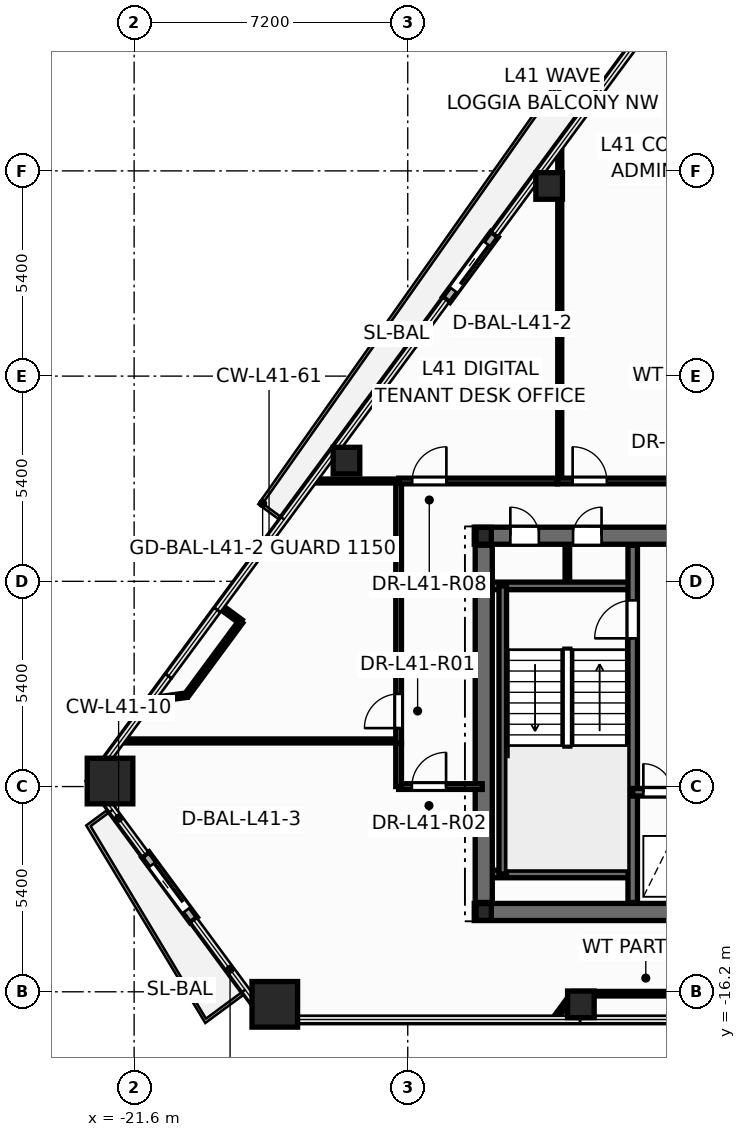
"""IFC4 building model, lengths in metres.
Left out: names, types, materials, properties, quantities, classifications, styles, units other than length and angle.
Written with IfcOpenShell. Run it as: python <this file> out.ifc"""

import sys

from ifc_helpers import new_model, si_unit, direction, frame, frame_2d, origin, origin_2d, place, context, subcontext, project, spatial, rectangle, hollow_rectangle, hollow_circle, i_section, extrude, element, fill, save


model = new_model("IFC4")
c1 = context("Model", 3, precision=1e-05, world=origin(), true_north=direction((0.0, 1.0)))
c2 = subcontext(c1, "Body", "Model", "MODEL_VIEW")
j1 = project(units=[si_unit("LENGTHUNIT", "METRE"), si_unit("PLANEANGLEUNIT", "RADIAN")], contexts=[c1])
p1 = place(None, origin())
s1 = spatial("IfcSite", under=j1, at=p1, CompositionType="ELEMENT")
p2 = place(p1, origin())
s2 = spatial("IfcBuilding", under=s1, at=p2, CompositionType="ELEMENT")
p3 = place(p2, frame((0.0, 0.0, 158.1)))
s3 = spatial("IfcBuildingStorey", under=s2, at=p3, CompositionType="ELEMENT", Elevation=158.1)
for number, where, z_axis, x_axis in (
    (1, (-22.234, -10.655, 0.0), (0.0, 0.0, 1.0), (1.0, 0.0, 0.0)),
    (2, (-17.898, -16.53, 0.0), (0.0, 0.0, 1.0), (1.0, 0.0, 0.0)),
):
    element("IfcColumn", number, at=place(p3, frame(where, z_axis=z_axis, x_axis=x_axis)), inside=s3, PredefinedType="COLUMN", context=c2, shape_type="SweptSolid", body=[
        extrude(hollow_rectangle(XDim=1.2, YDim=1.2, WallThickness=0.055, at=origin_2d()), origin(), (0.0, 0.0, 1.0), 3.6),
    ])
for number, where, z_axis, x_axis in (
    (3, (-9.844, -16.53, 0.0), (0.0, 0.0, 1.0), (1.0, 0.0, 0.0)),
    (4, (-10.679, 5.003, 0.0), (0.0, 0.0, 1.0), (1.0, 0.0, 0.0)),
    (5, (-16.012, -2.223, 0.0), (0.0, 0.0, 1.0), (1.0, 0.0, 0.0)),
):
    element("IfcColumn", number, at=place(p3, frame(where, z_axis=z_axis, x_axis=x_axis)), inside=s3, PredefinedType="COLUMN", context=c2, shape_type="SweptSolid", body=[
        extrude(hollow_circle(Radius=0.35, WallThickness=0.03, at=origin_2d()), origin(), (0.0, 0.0, 1.0), 3.6),
    ])
for number, where, z_axis, x_axis in (
    (6, (-12.4, -14.1, 0.0), (0.0, 0.0, 1.0), (1.0, 0.0, 0.0)),
    (7, (-12.4, -4.2, 0.0), (0.0, 0.0, 1.0), (1.0, 0.0, 0.0)),
):
    element("IfcColumn", number, at=place(p3, frame(where, z_axis=z_axis, x_axis=x_axis)), inside=s3, PredefinedType="COLUMN", context=c2, shape_type="SweptSolid", body=[
        extrude(i_section(OverallWidth=0.4, OverallDepth=0.44, WebThickness=0.028, FlangeThickness=0.04, at=origin_2d()), origin(), (0.0, 0.0, 1.0), 3.6),
    ])
p4 = place(p3, frame((-12.115, 3.731, -0.015), z_axis=(0.0, 0.0, 1.0), x_axis=(-0.593794270714, -0.804616905158, 0.0)))
e8 = element("IfcWall", 8, at=p4, inside=s3, PredefinedType="STANDARD", context=c2, shape_type="SweptSolid", body=[
    extrude(rectangle(XDim=2.14, YDim=0.24, at=frame_2d((1.07, 0.0))), origin(), (0.0, 0.0, 1.0), 2.807),
])
p5 = place(p4, frame((0.32, 0.0, 0.015)))
e9 = element("IfcOpeningElement", 9, at=p5, cuts=e8, PredefinedType="OPENING", context=c2, shape_type="SweptSolid", body=[
    extrude(rectangle(XDim=1.506, YDim=2.204, at=frame_2d((0.75, 1.102))), frame((0.0, 0.13, 0.0), z_axis=(0.0, -1.0, 0.0), x_axis=(1.0, 0.0, 0.0)), (0.0, 0.0, 1.0), 0.26),
])
p6 = place(p3, frame((-21.303, -12.589, -0.015), z_axis=(0.0, 0.0, 1.0), x_axis=(0.593794270714, -0.804616905158, 0.0)))
e10 = element("IfcWall", 10, at=p6, inside=s3, PredefinedType="STANDARD", context=c2, shape_type="SweptSolid", body=[
    extrude(rectangle(XDim=2.14, YDim=0.24, at=frame_2d((1.07, 0.0))), origin(), (0.0, 0.0, 1.0), 2.807),
])
p7 = place(p6, frame((0.32, 0.0, 0.015)))
e11 = element("IfcOpeningElement", 11, at=p7, cuts=e10, PredefinedType="OPENING", context=c2, shape_type="SweptSolid", body=[
    extrude(rectangle(XDim=1.506, YDim=2.204, at=frame_2d((0.75, 1.102))), frame((0.0, 0.13, 0.0), z_axis=(0.0, -1.0, 0.0), x_axis=(1.0, 0.0, 0.0)), (0.0, 0.0, 1.0), 0.26),
])
p8 = place(p3, frame((-10.2, -5.52, 0.0), z_axis=(0.0, 0.0, 1.0), x_axis=(0.0, 1.0, 0.0)))
e12 = element("IfcWall", 12, at=p8, inside=s3, PredefinedType="PARTITIONING", context=c2, shape_type="SweptSolid", body=[
    extrude(rectangle(XDim=1.12, YDim=0.12, at=frame_2d((0.56, 0.0))), origin(), (0.0, 0.0, 1.0), 3.35),
])
p9 = place(p3, frame((-12.65, -14.1, 0.0), z_axis=(0.0, 0.0, 1.0), x_axis=(1.0, 0.0, 0.0)))
e13 = element("IfcWall", 13, at=p9, inside=s3, PredefinedType="SHEAR", context=c2, shape_type="SweptSolid", body=[
    extrude(rectangle(XDim=25.3, YDim=0.45, at=frame_2d((12.65, 0.0))), origin(), (0.0, 0.0, 1.0), 3.6),
])
p10 = place(p3, frame((-12.65, -4.2, 0.0), z_axis=(0.0, 0.0, 1.0), x_axis=(1.0, 0.0, 0.0)))
e14 = element("IfcWall", 14, at=p10, inside=s3, PredefinedType="SHEAR", context=c2, shape_type="SweptSolid", body=[
    extrude(rectangle(XDim=25.3, YDim=0.45, at=frame_2d((12.65, 0.0))), origin(), (0.0, 0.0, 1.0), 3.6),
])
p11 = place(p10, frame((0.95, 0.0, 0.0)))
e15 = element("IfcOpeningElement", 15, at=p11, cuts=e14, PredefinedType="OPENING", context=c2, shape_type="SweptSolid", body=[
    extrude(rectangle(XDim=0.756, YDim=2.054, at=frame_2d((0.375, 1.027))), frame((0.0, 0.235, 0.0), z_axis=(0.0, -1.0, 0.0), x_axis=(1.0, 0.0, 0.0)), (0.0, 0.0, 1.0), 0.47),
])
p12 = place(p10, frame((2.6, 0.0, 0.0)))
e16 = element("IfcOpeningElement", 16, at=p12, cuts=e14, PredefinedType="OPENING", context=c2, shape_type="SweptSolid", body=[
    extrude(rectangle(XDim=0.756, YDim=2.054, at=frame_2d((0.375, 1.027))), frame((0.0, 0.235, 0.0), z_axis=(0.0, -1.0, 0.0), x_axis=(1.0, 0.0, 0.0)), (0.0, 0.0, 1.0), 0.47),
])
p13 = place(p10, frame((21.85, 0.0, 0.0)))
e17 = element("IfcOpeningElement", 17, at=p13, cuts=e14, PredefinedType="OPENING", context=c2, shape_type="SweptSolid", body=[
    extrude(rectangle(XDim=0.756, YDim=2.054, at=frame_2d((0.375, 1.027))), frame((0.0, 0.235, 0.0), z_axis=(0.0, -1.0, 0.0), x_axis=(1.0, 0.0, 0.0)), (0.0, 0.0, 1.0), 0.47),
])
p14 = place(p10, frame((23.5, 0.0, 0.0)))
e18 = element("IfcOpeningElement", 18, at=p14, cuts=e14, PredefinedType="OPENING", context=c2, shape_type="SweptSolid", body=[
    extrude(rectangle(XDim=0.756, YDim=2.054, at=frame_2d((0.375, 1.027))), frame((0.0, 0.235, 0.0), z_axis=(0.0, -1.0, 0.0), x_axis=(1.0, 0.0, 0.0)), (0.0, 0.0, 1.0), 0.47),
])
p15 = place(p10, frame((5.85, 0.0, 0.0)))
e19 = element("IfcOpeningElement", 19, at=p15, cuts=e14, PredefinedType="OPENING", context=c2, shape_type="SweptSolid", body=[
    extrude(rectangle(XDim=1.006, YDim=2.104, at=frame_2d((0.5, 1.052))), frame((0.0, 0.235, 0.0), z_axis=(0.0, -1.0, 0.0), x_axis=(1.0, 0.0, 0.0)), (0.0, 0.0, 1.0), 0.47),
])
p16 = place(p10, frame((10.35, 0.0, 0.0)))
e20 = element("IfcOpeningElement", 20, at=p16, cuts=e14, PredefinedType="OPENING", context=c2, shape_type="SweptSolid", body=[
    extrude(rectangle(XDim=1.406, YDim=2.154, at=frame_2d((0.7, 1.077))), frame((0.0, 0.235, 0.0), z_axis=(0.0, -1.0, 0.0), x_axis=(1.0, 0.0, 0.0)), (0.0, 0.0, 1.0), 0.47),
])
p17 = place(p10, frame((18.45, 0.0, 0.0)))
e21 = element("IfcOpeningElement", 21, at=p17, cuts=e14, PredefinedType="OPENING", context=c2, shape_type="SweptSolid", body=[
    extrude(rectangle(XDim=1.006, YDim=2.104, at=frame_2d((0.5, 1.052))), frame((0.0, 0.235, 0.0), z_axis=(0.0, -1.0, 0.0), x_axis=(1.0, 0.0, 0.0)), (0.0, 0.0, 1.0), 0.47),
])
for number, where, z_axis, x_axis in (
    (22, (-12.35, -5.52, 0.0), (0.0, 0.0, 1.0), (1.0, 0.0, 0.0)),
    (23, (-12.35, -13.1, 0.0), (0.0, 0.0, 1.0), (1.0, 0.0, 0.0)),
):
    element("IfcWall", number, at=place(p3, frame(where, z_axis=z_axis, x_axis=x_axis)), inside=s3, PredefinedType="SOLIDWALL", context=c2, shape_type="SweptSolid", body=[
        extrude(rectangle(XDim=3.87, YDim=0.2, at=frame_2d((1.935, 0.0))), origin(), (0.0, 0.0, 1.0), 3.6),
    ])
p18 = place(p3, frame((-11.9, -13.1, 0.0), z_axis=(0.0, 0.0, 1.0), x_axis=(0.0, 1.0, 0.0)))
e24 = element("IfcWall", 24, at=p18, inside=s3, PredefinedType="SOLIDWALL", context=c2, shape_type="SweptSolid", body=[
    extrude(rectangle(XDim=7.58, YDim=0.2, at=frame_2d((3.79, 0.0))), origin(), (0.0, 0.0, 1.0), 3.6),
])
p19 = place(p3, frame((-8.48, -13.85, 0.0), z_axis=(0.0, 0.0, 1.0), x_axis=(0.0, 1.0, 0.0)))
e25 = element("IfcWall", 25, at=p19, inside=s3, PredefinedType="SHEAR", context=c2, shape_type="SweptSolid", body=[
    extrude(rectangle(XDim=9.4, YDim=0.25, at=frame_2d((4.7, 0.0))), origin(), (0.0, 0.0, 1.0), 3.6),
])
p20 = place(p19, frame((6.95, 0.0, 0.0)))
e26 = element("IfcOpeningElement", 26, at=p20, cuts=e25, PredefinedType="OPENING", context=c2, shape_type="SweptSolid", body=[
    extrude(rectangle(XDim=1.006, YDim=2.104, at=frame_2d((0.5, 1.052))), frame((0.0, 0.135, 0.0), z_axis=(0.0, -1.0, 0.0), x_axis=(1.0, 0.0, 0.0)), (0.0, 0.0, 1.0), 0.27),
])
p21 = place(p3, frame((-8.48, -10.95, 0.0), z_axis=(0.0, 0.0, 1.0), x_axis=(1.0, 0.0, 0.0)))
e27 = element("IfcWall", 27, at=p21, inside=s3, PredefinedType="SOLIDWALL", context=c2, shape_type="SweptSolid", body=[
    extrude(rectangle(XDim=3.36, YDim=0.2, at=frame_2d((1.68, 0.0))), origin(), (0.0, 0.0, 1.0), 3.6),
])
p22 = place(p21, frame((0.28, 0.0, 0.0)))
e28 = element("IfcOpeningElement", 28, at=p22, cuts=e27, PredefinedType="OPENING", context=c2, shape_type="SweptSolid", body=[
    extrude(rectangle(XDim=0.756, YDim=2.054, at=frame_2d((0.375, 1.027))), frame((0.0, 0.11, 0.0), z_axis=(0.0, -1.0, 0.0), x_axis=(1.0, 0.0, 0.0)), (0.0, 0.0, 1.0), 0.22),
])
p23 = place(p21, frame((1.85, 0.0, 0.0)))
e29 = element("IfcOpeningElement", 29, at=p23, cuts=e27, PredefinedType="OPENING", context=c2, shape_type="SweptSolid", body=[
    extrude(rectangle(XDim=1.106, YDim=2.104, at=frame_2d((0.55, 1.052))), frame((0.0, 0.11, 0.0), z_axis=(0.0, -1.0, 0.0), x_axis=(1.0, 0.0, 0.0)), (0.0, 0.0, 1.0), 0.22),
])
p24 = place(p3, frame((-12.4, -13.85, 0.0), z_axis=(0.0, 0.0, 1.0), x_axis=(0.0, 1.0, 0.0)))
e30 = element("IfcWall", 30, at=p24, inside=s3, PredefinedType="SHEAR", context=c2, shape_type="SweptSolid", body=[
    extrude(rectangle(XDim=9.4, YDim=0.45, at=frame_2d((4.7, 0.0))), origin(), (0.0, 0.0, 1.0), 3.6),
])
p25 = place(p3, frame((-10.4, -2.76, 0.0), z_axis=(0.0, 0.0, 1.0), x_axis=(0.0, 1.0, 0.0)))
e31 = element("IfcWall", 31, at=p25, inside=s3, PredefinedType="PARTITIONING", context=c2, shape_type="SweptSolid", body=[
    extrude(rectangle(XDim=8.815, YDim=0.105, at=frame_2d((4.408, 0.0))), origin(), (0.0, 0.0, 1.0), 2.617),
])
p26 = place(p3, frame((-21.953, -9.6, 0.0), z_axis=(0.0, 0.0, 1.0), x_axis=(1.0, 0.0, 0.0)))
e32 = element("IfcWall", 32, at=p26, inside=s3, PredefinedType="PARTITIONING", context=c2, shape_type="SweptSolid", body=[
    extrude(rectangle(XDim=7.313, YDim=0.105, at=frame_2d((3.656, 0.0))), origin(), (0.0, 0.0, 1.0), 2.325),
])
p27 = place(p3, frame((-14.64, -9.66, 0.0), z_axis=(0.0, 0.0, 1.0), x_axis=(0.0, 1.0, 0.0)))
e33 = element("IfcWall", 33, at=p27, inside=s3, PredefinedType="PARTITIONING", context=c2, shape_type="SweptSolid", body=[
    extrude(rectangle(XDim=6.9, YDim=0.15, at=frame_2d((3.45, 0.0))), origin(), (0.0, 0.0, 1.0), 2.325),
])
p28 = place(p27, frame((0.398, 0.0, 0.0)))
e34 = element("IfcOpeningElement", 34, at=p28, cuts=e33, PredefinedType="OPENING", context=c2, shape_type="SweptSolid", body=[
    extrude(rectangle(XDim=0.906, YDim=2.104, at=frame_2d((0.45, 1.052))), frame((0.0, 0.085, 0.0), z_axis=(0.0, -1.0, 0.0), x_axis=(1.0, 0.0, 0.0)), (0.0, 0.0, 1.0), 0.17),
])
p29 = place(p3, frame((-10.46, -2.76, 0.0), z_axis=(0.0, 0.0, 1.0), x_axis=(1.0, 0.0, 0.0)))
e35 = element("IfcWall", 35, at=p29, inside=s3, PredefinedType="PARTITIONING", context=c2, shape_type="SweptSolid", body=[
    extrude(rectangle(XDim=6.12, YDim=0.15, at=frame_2d((3.06, 0.0))), origin(), (0.0, 0.0, 1.0), 2.325),
])
p30 = place(p29, frame((0.399, 0.0, 0.0)))
e36 = element("IfcOpeningElement", 36, at=p30, cuts=e35, PredefinedType="OPENING", context=c2, shape_type="SweptSolid", body=[
    extrude(rectangle(XDim=0.906, YDim=2.104, at=frame_2d((0.45, 1.052))), frame((0.0, 0.085, 0.0), z_axis=(0.0, -1.0, 0.0), x_axis=(1.0, 0.0, 0.0)), (0.0, 0.0, 1.0), 0.17),
])
p31 = place(p3, frame((-14.64, -2.76, 0.0), z_axis=(0.0, 0.0, 1.0), x_axis=(1.0, 0.0, 0.0)))
e37 = element("IfcWall", 37, at=p31, inside=s3, PredefinedType="PARTITIONING", context=c2, shape_type="SweptSolid", body=[
    extrude(rectangle(XDim=4.178, YDim=0.15, at=frame_2d((2.089, 0.0))), origin(), (0.0, 0.0, 1.0), 3.35),
])
p32 = place(p31, frame((0.357, 0.0, 0.0)))
e38 = element("IfcOpeningElement", 38, at=p32, cuts=e37, PredefinedType="OPENING", context=c2, shape_type="SweptSolid", body=[
    extrude(rectangle(XDim=0.906, YDim=2.104, at=frame_2d((0.45, 1.052))), frame((0.0, 0.085, 0.0), z_axis=(0.0, -1.0, 0.0), x_axis=(1.0, 0.0, 0.0)), (0.0, 0.0, 1.0), 0.17),
])
p33 = place(p3, frame((-10.042, -16.25, 0.0), z_axis=(0.0, 0.0, 1.0), x_axis=(1.0, 0.0, 0.0)))
e39 = element("IfcWall", 39, at=p33, inside=s3, PredefinedType="PARTITIONING", context=c2, shape_type="SweptSolid", body=[
    extrude(rectangle(XDim=3.811, YDim=0.12, at=frame_2d((1.906, 0.0))), origin(), (0.0, 0.0, 1.0), 2.792),
])
p34 = place(p3, frame((-18.792, -6.461, 0.0), z_axis=(0.0, 0.0, 1.0), x_axis=(-0.593694221043, -0.804690730591, 0.0)))
e40 = element("IfcWall", 40, at=p34, inside=s3, PredefinedType="PARTITIONING", context=c2, shape_type="SweptSolid", body=[
    extrude(rectangle(XDim=2.405, YDim=0.12, at=frame_2d((1.202, 0.0))), origin(), (0.0, 0.0, 1.0), 3.35),
])
p35 = place(p3, frame((-16.905, -2.76, 0.0), z_axis=(0.0, 0.0, 1.0), x_axis=(1.0, 0.0, 0.0)))
e41 = element("IfcWall", 41, at=p35, inside=s3, PredefinedType="PARTITIONING", context=c2, shape_type="SweptSolid", body=[
    extrude(rectangle(XDim=2.265, YDim=0.105, at=frame_2d((1.133, 0.0))), origin(), (0.0, 0.0, 1.0), 2.792),
])
p36 = place(p3, frame((-14.64, -10.8, 0.0), z_axis=(0.0, 0.0, 1.0), x_axis=(1.0, 0.0, 0.0)))
e42 = element("IfcWall", 42, at=p36, inside=s3, PredefinedType="PARTITIONING", context=c2, shape_type="SweptSolid", body=[
    extrude(rectangle(XDim=2.2, YDim=0.15, at=frame_2d((1.1, 0.0))), origin(), (0.0, 0.0, 1.0), 2.792),
])
p37 = place(p36, frame((0.349, 0.0, 0.0)))
e43 = element("IfcOpeningElement", 43, at=p37, cuts=e42, PredefinedType="OPENING", context=c2, shape_type="SweptSolid", body=[
    extrude(rectangle(XDim=0.906, YDim=2.104, at=frame_2d((0.45, 1.052))), frame((0.0, 0.085, 0.0), z_axis=(0.0, -1.0, 0.0), x_axis=(1.0, 0.0, 0.0)), (0.0, 0.0, 1.0), 0.17),
])
p38 = place(p3, frame((-14.64, -10.8, 0.0), z_axis=(0.0, 0.0, 1.0), x_axis=(0.0, 1.0, 0.0)))
e44 = element("IfcWall", 44, at=p38, inside=s3, PredefinedType="PARTITIONING", context=c2, shape_type="SweptSolid", body=[
    extrude(rectangle(XDim=1.138, YDim=0.15, at=frame_2d((0.569, 0.0))), origin(), (0.0, 0.0, 1.0), 3.35),
])
p39 = place(p3, frame((-20.219, -8.396, 0.0), z_axis=(0.0, 0.0, 1.0), x_axis=(-0.990865129617, -0.134856571617, 0.0)))
e45 = element("IfcWall", 45, at=p39, inside=s3, PredefinedType="PARTITIONING", context=c2, shape_type="SweptSolid", body=[
    extrude(rectangle(XDim=0.849, YDim=0.12, at=frame_2d((0.425, 0.0))), origin(), (0.0, 0.0, 1.0), 2.792),
])
p40 = place(p3, frame((-10.533, -16.92, 0.0), z_axis=(0.0, 0.0, 1.0), x_axis=(0.591694765298, 0.806162083405, 0.0)))
e46 = element("IfcWall", 46, at=p40, inside=s3, PredefinedType="PARTITIONING", context=c2, shape_type="SweptSolid", body=[
    extrude(rectangle(XDim=0.831, YDim=0.12, at=frame_2d((0.416, 0.0))), origin(), (0.0, 0.0, 1.0), 2.792),
])
p41 = place(p3, frame((-19.331, -6.063, 0.0), z_axis=(0.0, 0.0, 1.0), x_axis=(0.804698441933, -0.59368376898, 0.0)))
e47 = element("IfcWall", 47, at=p41, inside=s3, PredefinedType="PARTITIONING", context=c2, shape_type="SweptSolid", body=[
    extrude(rectangle(XDim=0.67, YDim=0.12, at=frame_2d((0.335, 0.0))), origin(), (0.0, 0.0, 1.0), 2.792),
])
p42 = place(p5, origin())
e48 = element("IfcDoor", 48, at=p42, inside=s3, OperationType="SLIDING_TO_RIGHT", PredefinedType="DOOR", context=c2, shape_type="SweptSolid", body=[
    extrude(rectangle(XDim=1.5, YDim=2.2, at=frame_2d((0.75, 1.1))), frame((0.0, 0.025, 0.0), z_axis=(0.0, -1.0, 0.0), x_axis=(1.0, 0.0, 0.0)), (0.0, 0.0, 1.0), 0.05),
])
fill(e9, e48)
p43 = place(p7, origin())
e49 = element("IfcDoor", 49, at=p43, inside=s3, OperationType="SLIDING_TO_RIGHT", PredefinedType="DOOR", context=c2, shape_type="SweptSolid", body=[
    extrude(rectangle(XDim=1.5, YDim=2.2, at=frame_2d((0.75, 1.1))), frame((0.0, 0.025, 0.0), z_axis=(0.0, -1.0, 0.0), x_axis=(1.0, 0.0, 0.0)), (0.0, 0.0, 1.0), 0.05),
])
fill(e11, e49)
p44 = place(p20, origin())
e50 = element("IfcDoor", 50, at=p44, inside=s3, OperationType="SINGLE_SWING_LEFT", PredefinedType="DOOR", context=c2, shape_type="SweptSolid", body=[
    extrude(rectangle(XDim=1.0, YDim=2.1, at=frame_2d((0.5, 1.05))), frame((0.0, 0.025, 0.0), z_axis=(0.0, -1.0, 0.0), x_axis=(1.0, 0.0, 0.0)), (0.0, 0.0, 1.0), 0.05),
])
fill(e26, e50)
p45 = place(p22, origin())
e51 = element("IfcDoor", 51, at=p45, inside=s3, OperationType="SINGLE_SWING_LEFT", PredefinedType="DOOR", context=c2, shape_type="SweptSolid", body=[
    extrude(rectangle(XDim=0.75, YDim=2.05, at=frame_2d((0.375, 1.025))), frame((0.0, 0.025, 0.0), z_axis=(0.0, -1.0, 0.0), x_axis=(1.0, 0.0, 0.0)), (0.0, 0.0, 1.0), 0.05),
])
fill(e28, e51)
p46 = place(p11, origin())
e52 = element("IfcDoor", 52, at=p46, inside=s3, OperationType="SINGLE_SWING_LEFT", PredefinedType="DOOR", context=c2, shape_type="SweptSolid", body=[
    extrude(rectangle(XDim=0.75, YDim=2.05, at=frame_2d((0.375, 1.025))), frame((0.0, 0.025, 0.0), z_axis=(0.0, -1.0, 0.0), x_axis=(1.0, 0.0, 0.0)), (0.0, 0.0, 1.0), 0.05),
])
fill(e15, e52)
p47 = place(p12, origin())
e53 = element("IfcDoor", 53, at=p47, inside=s3, OperationType="SINGLE_SWING_RIGHT", PredefinedType="DOOR", context=c2, shape_type="SweptSolid", body=[
    extrude(rectangle(XDim=0.75, YDim=2.05, at=frame_2d((0.375, 1.025))), frame((0.0, 0.025, 0.0), z_axis=(0.0, -1.0, 0.0), x_axis=(1.0, 0.0, 0.0)), (0.0, 0.0, 1.0), 0.05),
])
fill(e16, e53)
p48 = place(p28, origin())
e54 = element("IfcDoor", 54, at=p48, inside=s3, OperationType="SINGLE_SWING_LEFT", PredefinedType="DOOR", context=c2, shape_type="SweptSolid", body=[
    extrude(rectangle(XDim=0.9, YDim=2.1, at=frame_2d((0.45, 1.05))), frame((0.0, 0.025, 0.0), z_axis=(0.0, -1.0, 0.0), x_axis=(1.0, 0.0, 0.0)), (0.0, 0.0, 1.0), 0.05),
])
fill(e34, e54)
p49 = place(p37, origin())
e55 = element("IfcDoor", 55, at=p49, inside=s3, OperationType="SINGLE_SWING_RIGHT", PredefinedType="DOOR", context=c2, shape_type="SweptSolid", body=[
    extrude(rectangle(XDim=0.9, YDim=2.1, at=frame_2d((0.45, 1.05))), frame((0.0, 0.025, 0.0), z_axis=(0.0, -1.0, 0.0), x_axis=(1.0, 0.0, 0.0)), (0.0, 0.0, 1.0), 0.05),
])
fill(e43, e55)
p50 = place(p32, origin())
e56 = element("IfcDoor", 56, at=p50, inside=s3, OperationType="SINGLE_SWING_RIGHT", PredefinedType="DOOR", context=c2, shape_type="SweptSolid", body=[
    extrude(rectangle(XDim=0.9, YDim=2.1, at=frame_2d((0.45, 1.05))), frame((0.0, 0.025, 0.0), z_axis=(0.0, -1.0, 0.0), x_axis=(1.0, 0.0, 0.0)), (0.0, 0.0, 1.0), 0.05),
])
fill(e38, e56)
p51 = place(p30, origin())
e57 = element("IfcDoor", 57, at=p51, inside=s3, OperationType="SINGLE_SWING_LEFT", PredefinedType="DOOR", context=c2, shape_type="SweptSolid", body=[
    extrude(rectangle(XDim=0.9, YDim=2.1, at=frame_2d((0.45, 1.05))), frame((0.0, 0.025, 0.0), z_axis=(0.0, -1.0, 0.0), x_axis=(1.0, 0.0, 0.0)), (0.0, 0.0, 1.0), 0.05),
])
fill(e36, e57)
save(model, sys.argv[1])
